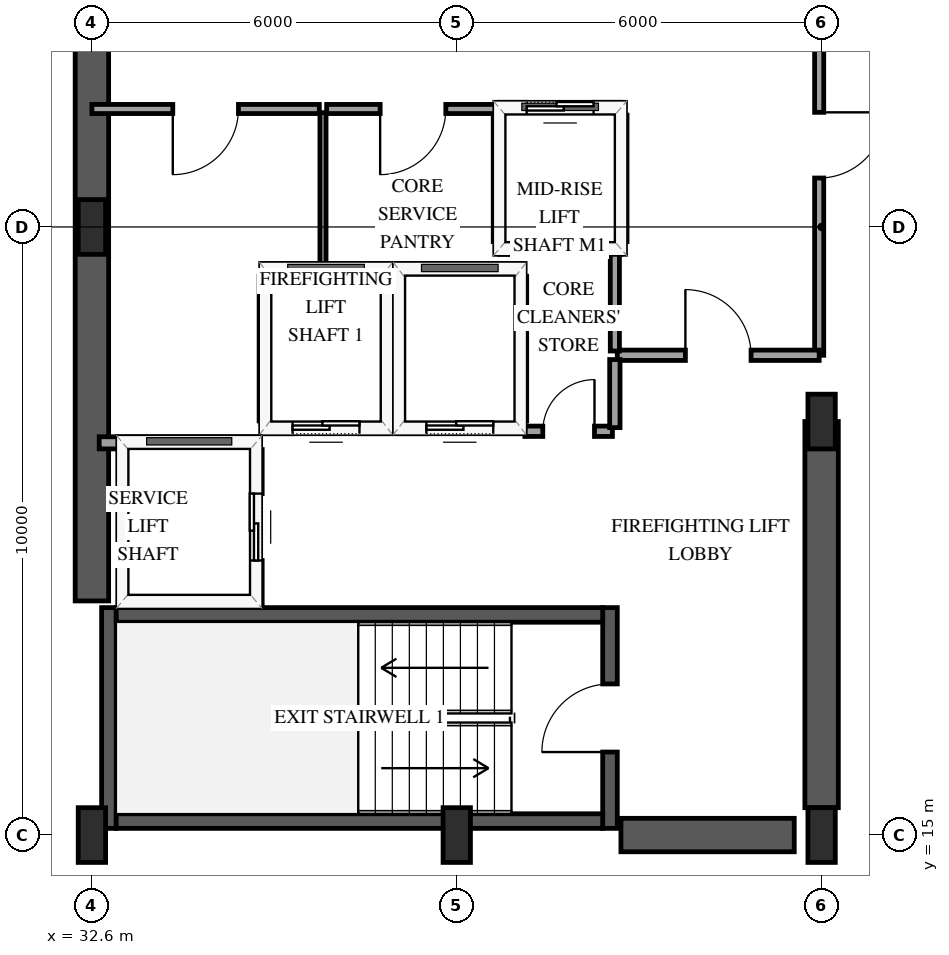
"""IFC4 building model, lengths in metres.
Left out: names, types, materials, properties, quantities, classifications, styles, units other than length and angle.
Written with IfcOpenShell. Run it as: python <this file> out.ifc"""

import sys

from ifc_helpers import new_model, si_unit, direction, frame, frame_2d, origin, origin_2d, place, context, subcontext, project, spatial, rectangle, extrude, element, fill, save


model = new_model("IFC4")
c1 = context("Model", 3, precision=1e-05, world=origin(), true_north=direction((0.0, 1.0)))
c2 = subcontext(c1, "Body", "Model", "MODEL_VIEW")
j1 = project(units=[si_unit("LENGTHUNIT", "METRE"), si_unit("PLANEANGLEUNIT", "RADIAN")], contexts=[c1])
p1 = place(None, origin())
s1 = spatial("IfcSite", under=j1, at=p1, CompositionType="ELEMENT")
p2 = place(p1, origin())
s2 = spatial("IfcBuilding", under=s1, at=p2, CompositionType="ELEMENT")
p3 = place(p2, frame((0.0, 0.0, 149.8)))
s3 = spatial("IfcBuildingStorey", under=s2, at=p3, CompositionType="ELEMENT", Elevation=149.8)
p4 = place(p3, frame((32.88, 15.11, 0.0), z_axis=(0.0, 0.0, 1.0), x_axis=(0.0, 1.0, 0.0)))
e1 = element("IfcWall", 1, at=p4, inside=s3, PredefinedType="SHEAR", context=c2, shape_type="SweptSolid", body=[
    extrude(rectangle(XDim=3.63, YDim=0.24, at=frame_2d((1.815, 0.0))), origin(), (0.0, 0.0, 1.0), 3.6),
])
p5 = place(p3, frame((41.12, 15.11, 0.0), z_axis=(0.0, 0.0, 1.0), x_axis=(0.0, 1.0, 0.0)))
e2 = element("IfcWall", 2, at=p5, inside=s3, PredefinedType="SHEAR", context=c2, shape_type="SweptSolid", body=[
    extrude(rectangle(XDim=3.63, YDim=0.24, at=frame_2d((1.815, 0.0))), origin(), (0.0, 0.0, 1.0), 3.6),
])
p6 = place(p5, frame((1.255, 0.0, 0.0)))
e3 = element("IfcOpeningElement", 3, at=p6, cuts=e2, PredefinedType="OPENING", context=c2, shape_type="SweptSolid", body=[
    extrude(rectangle(XDim=1.12, YDim=2.15, at=frame_2d((0.56, 1.075))), frame((0.0, 0.13, 0.0), z_axis=(0.0, -1.0, 0.0), x_axis=(1.0, 0.0, 0.0)), (0.0, 0.0, 1.0), 0.26),
])
for number, where, z_axis, x_axis in (
    (4, (33.0, 15.23, 0.0), (0.0, 0.0, 1.0), (1.0, 0.0, 0.0)),
    (5, (33.0, 18.62, 0.0), (0.0, 0.0, 1.0), (1.0, 0.0, 0.0)),
):
    element("IfcWall", number, at=place(p3, frame(where, z_axis=z_axis, x_axis=x_axis)), inside=s3, PredefinedType="SHEAR", context=c2, shape_type="SweptSolid", body=[
        extrude(rectangle(XDim=8.0, YDim=0.24, at=frame_2d((4.0, 0.0))), origin(), (0.0, 0.0, 1.0), 3.6),
    ])
p7 = place(p3, frame((32.6, 18.85, 0.0), z_axis=(0.0, 0.0, 1.0), x_axis=(0.0, 1.0, 0.0)))
e6 = element("IfcWall", 6, at=p7, inside=s3, PredefinedType="SHEAR", context=c2, shape_type="SweptSolid", body=[
    extrude(rectangle(XDim=12.3, YDim=0.55, at=frame_2d((6.15, 0.0))), origin(), (0.0, 0.0, 1.0), 3.6),
])
p8 = place(p3, frame((41.3, 15.0, 0.0), z_axis=(0.0, 0.0, 1.0), x_axis=(1.0, 0.0, 0.0)))
e7 = element("IfcWall", 7, at=p8, inside=s3, PredefinedType="SHEAR", context=c2, shape_type="SweptSolid", body=[
    extrude(rectangle(XDim=2.85, YDim=0.55, at=frame_2d((1.425, 0.0))), origin(), (0.0, 0.0, 1.0), 3.6),
])
p9 = place(p3, frame((44.6, 15.45, 0.0), z_axis=(0.0, 0.0, 1.0), x_axis=(0.0, 1.0, 0.0)))
e8 = element("IfcWall", 8, at=p9, inside=s3, PredefinedType="SHEAR", context=c2, shape_type="SweptSolid", body=[
    extrude(rectangle(XDim=6.35, YDim=0.55, at=frame_2d((3.175, 0.0))), origin(), (0.0, 0.0, 1.0), 3.6),
])
for number, where, z_axis, x_axis in (
    (9, (32.6, 15.0, 0.0), (0.0, 0.0, 1.0), (1.0, 0.0, 0.0)),
    (10, (32.6, 25.0, 0.0), (0.0, 0.0, 1.0), (1.0, 0.0, 0.0)),
    (11, (38.6, 15.0, 0.0), (0.0, 0.0, 1.0), (1.0, 0.0, 0.0)),
    (12, (44.6, 15.0, 0.0), (0.0, 0.0, 1.0), (1.0, 0.0, 0.0)),
    (13, (44.6, 21.8, 0.0), (0.0, 0.0, 1.0), (1.0, 0.0, 0.0)),
):
    element("IfcColumn", number, at=place(p3, frame(where, z_axis=z_axis, x_axis=x_axis)), inside=s3, PredefinedType="PILASTER", context=c2, shape_type="SweptSolid", body=[
        extrude(rectangle(XDim=0.45, YDim=0.9, at=origin_2d()), origin(), (0.0, 0.0, 1.0), 3.6),
    ])
p10 = place(p3, frame((35.45, 21.7, 0.0), z_axis=(0.0, 0.0, 1.0), x_axis=(1.0, 0.0, 0.0)))
e14 = element("IfcWall", 14, at=p10, inside=s3, PredefinedType="SOLIDWALL", context=c2, shape_type="SweptSolid", body=[
    extrude(rectangle(XDim=2.0, YDim=0.2, at=frame_2d((1.0, 0.0))), origin(), (0.0, 0.0, 1.0), 3.3),
])
p11 = place(p10, frame((0.45, 0.0, 0.0)))
e15 = element("IfcOpeningElement", 15, at=p11, cuts=e14, PredefinedType="OPENING", context=c2, shape_type="SweptSolid", body=[
    extrude(rectangle(XDim=1.1, YDim=2.15, at=frame_2d((0.55, 1.075))), frame((0.0, 0.11, 0.0), z_axis=(0.0, -1.0, 0.0), x_axis=(1.0, 0.0, 0.0)), (0.0, 0.0, 1.0), 0.22),
])
p12 = place(p3, frame((35.45, 24.3, 0.0), z_axis=(0.0, 0.0, 1.0), x_axis=(1.0, 0.0, 0.0)))
e16 = element("IfcWall", 16, at=p12, inside=s3, PredefinedType="SOLIDWALL", context=c2, shape_type="SweptSolid", body=[
    extrude(rectangle(XDim=2.0, YDim=0.2, at=frame_2d((1.0, 0.0))), origin(), (0.0, 0.0, 1.0), 3.3),
])
for number, where, z_axis, x_axis in (
    (17, (35.45, 21.81, 0.0), (0.0, 0.0, 1.0), (0.0, 1.0, 0.0)),
    (18, (37.45, 21.81, 0.0), (0.0, 0.0, 1.0), (0.0, 1.0, 0.0)),
):
    element("IfcWall", number, at=place(p3, frame(where, z_axis=z_axis, x_axis=x_axis)), inside=s3, PredefinedType="SOLIDWALL", context=c2, shape_type="SweptSolid", body=[
        extrude(rectangle(XDim=2.38, YDim=0.2, at=frame_2d((1.19, 0.0))), origin(), (0.0, 0.0, 1.0), 3.3),
    ])
p13 = place(p3, frame((37.65, 21.7, 0.0), z_axis=(0.0, 0.0, 1.0), x_axis=(1.0, 0.0, 0.0)))
e19 = element("IfcWall", 19, at=p13, inside=s3, PredefinedType="SOLIDWALL", context=c2, shape_type="SweptSolid", body=[
    extrude(rectangle(XDim=2.0, YDim=0.2, at=frame_2d((1.0, 0.0))), origin(), (0.0, 0.0, 1.0), 3.3),
])
p14 = place(p13, frame((0.45, 0.0, 0.0)))
e20 = element("IfcOpeningElement", 20, at=p14, cuts=e19, PredefinedType="OPENING", context=c2, shape_type="SweptSolid", body=[
    extrude(rectangle(XDim=1.1, YDim=2.15, at=frame_2d((0.55, 1.075))), frame((0.0, 0.11, 0.0), z_axis=(0.0, -1.0, 0.0), x_axis=(1.0, 0.0, 0.0)), (0.0, 0.0, 1.0), 0.22),
])
p15 = place(p3, frame((37.65, 24.3, 0.0), z_axis=(0.0, 0.0, 1.0), x_axis=(1.0, 0.0, 0.0)))
e21 = element("IfcWall", 21, at=p15, inside=s3, PredefinedType="SOLIDWALL", context=c2, shape_type="SweptSolid", body=[
    extrude(rectangle(XDim=2.0, YDim=0.2, at=frame_2d((1.0, 0.0))), origin(), (0.0, 0.0, 1.0), 3.3),
])
p16 = place(p3, frame((39.65, 21.81, 0.0), z_axis=(0.0, 0.0, 1.0), x_axis=(0.0, 1.0, 0.0)))
e22 = element("IfcWall", 22, at=p16, inside=s3, PredefinedType="SOLIDWALL", context=c2, shape_type="SweptSolid", body=[
    extrude(rectangle(XDim=2.38, YDim=0.2, at=frame_2d((1.19, 0.0))), origin(), (0.0, 0.0, 1.0), 3.3),
])
p17 = place(p3, frame((32.72, 21.45, 0.0), z_axis=(0.0, 0.0, 1.0), x_axis=(1.0, 0.0, 0.0)))
e23 = element("IfcWall", 23, at=p17, inside=s3, PredefinedType="SOLIDWALL", context=c2, shape_type="SweptSolid", body=[
    extrude(rectangle(XDim=2.58, YDim=0.2, at=frame_2d((1.29, 0.0))), origin(), (0.0, 0.0, 1.0), 3.3),
])
p18 = place(p3, frame((35.3, 18.79, 0.0), z_axis=(0.0, 0.0, 1.0), x_axis=(0.0, 1.0, 0.0)))
e24 = element("IfcWall", 24, at=p18, inside=s3, PredefinedType="SOLIDWALL", context=c2, shape_type="SweptSolid", body=[
    extrude(rectangle(XDim=2.55, YDim=0.2, at=frame_2d((1.275, 0.0))), origin(), (0.0, 0.0, 1.0), 3.3),
])
p19 = place(p18, frame((0.725, 0.0, 0.0)))
e25 = element("IfcOpeningElement", 25, at=p19, cuts=e24, PredefinedType="OPENING", context=c2, shape_type="SweptSolid", body=[
    extrude(rectangle(XDim=1.1, YDim=2.15, at=frame_2d((0.55, 1.075))), frame((0.0, 0.11, 0.0), z_axis=(0.0, -1.0, 0.0), x_axis=(1.0, 0.0, 0.0)), (0.0, 0.0, 1.0), 0.22),
])
p20 = place(p3, frame((39.3, 24.65, 0.0), z_axis=(0.0, 0.0, 1.0), x_axis=(1.0, 0.0, 0.0)))
e26 = element("IfcWall", 26, at=p20, inside=s3, PredefinedType="SOLIDWALL", context=c2, shape_type="SweptSolid", body=[
    extrude(rectangle(XDim=2.0, YDim=0.2, at=frame_2d((1.0, 0.0))), origin(), (0.0, 0.0, 1.0), 3.3),
])
p21 = place(p3, frame((39.3, 26.95, 0.0), z_axis=(0.0, 0.0, 1.0), x_axis=(1.0, 0.0, 0.0)))
e27 = element("IfcWall", 27, at=p21, inside=s3, PredefinedType="SOLIDWALL", context=c2, shape_type="SweptSolid", body=[
    extrude(rectangle(XDim=2.0, YDim=0.2, at=frame_2d((1.0, 0.0))), origin(), (0.0, 0.0, 1.0), 3.3),
])
p22 = place(p21, frame((0.45, 0.0, 0.0)))
e28 = element("IfcOpeningElement", 28, at=p22, cuts=e27, PredefinedType="OPENING", context=c2, shape_type="SweptSolid", body=[
    extrude(rectangle(XDim=1.1, YDim=2.15, at=frame_2d((0.55, 1.075))), frame((0.0, 0.11, 0.0), z_axis=(0.0, -1.0, 0.0), x_axis=(1.0, 0.0, 0.0)), (0.0, 0.0, 1.0), 0.22),
])
for number, where, z_axis, x_axis in (
    (29, (39.3, 24.76, 0.0), (0.0, 0.0, 1.0), (0.0, 1.0, 0.0)),
    (30, (41.3, 24.76, 0.0), (0.0, 0.0, 1.0), (0.0, 1.0, 0.0)),
):
    element("IfcWall", number, at=place(p3, frame(where, z_axis=z_axis, x_axis=x_axis)), inside=s3, PredefinedType="SOLIDWALL", context=c2, shape_type="SweptSolid", body=[
        extrude(rectangle(XDim=2.08, YDim=0.2, at=frame_2d((1.04, 0.0))), origin(), (0.0, 0.0, 1.0), 3.3),
    ])
p23 = place(p3, frame((44.56, 29.8, 0.0), z_axis=(0.0, 0.0, 1.0), x_axis=(0.0, -1.0, 0.0)))
e31 = element("IfcWall", 31, at=p23, inside=s3, PredefinedType="PARTITIONING", context=c2, shape_type="SweptSolid", body=[
    extrude(rectangle(XDim=6.91, YDim=0.15, at=frame_2d((3.455, 0.0))), origin(), (0.0, 0.0, 1.0), 2.34),
])
p24 = place(p23, frame((2.915, 0.0, 0.0)))
e32 = element("IfcOpeningElement", 32, at=p24, cuts=e31, PredefinedType="OPENING", context=c2, shape_type="SweptSolid", body=[
    extrude(rectangle(XDim=1.08, YDim=2.15, at=frame_2d((0.54, 1.075))), frame((0.0, 0.085, 0.0), z_axis=(0.0, -1.0, 0.0), x_axis=(1.0, 0.0, 0.0)), (0.0, 0.0, 1.0), 0.17),
])
p25 = place(p3, frame((36.34, 26.94, 0.0), z_axis=(0.0, 0.0, 1.0), x_axis=(-1.0, 0.0, 0.0)))
e33 = element("IfcWall", 33, at=p25, inside=s3, PredefinedType="PARTITIONING", context=c2, shape_type="SweptSolid", body=[
    extrude(rectangle(XDim=3.74, YDim=0.15, at=frame_2d((1.87, 0.0))), origin(), (0.0, 0.0, 1.0), 3.3),
])
p26 = place(p25, frame((1.33, 0.0, 0.0)))
e34 = element("IfcOpeningElement", 34, at=p26, cuts=e33, PredefinedType="OPENING", context=c2, shape_type="SweptSolid", body=[
    extrude(rectangle(XDim=1.08, YDim=2.15, at=frame_2d((0.54, 1.075))), frame((0.0, 0.085, 0.0), z_axis=(0.0, -1.0, 0.0), x_axis=(1.0, 0.0, 0.0)), (0.0, 0.0, 1.0), 0.17),
])
p27 = place(p3, frame((41.24, 22.89, 0.0), z_axis=(0.0, 0.0, 1.0), x_axis=(1.0, 0.0, 0.0)))
e35 = element("IfcWall", 35, at=p27, inside=s3, PredefinedType="PARTITIONING", context=c2, shape_type="SweptSolid", body=[
    extrude(rectangle(XDim=3.32, YDim=0.17, at=frame_2d((1.66, 0.0))), origin(), (0.0, 0.0, 1.0), 3.3),
])
p28 = place(p27, frame((1.12, 0.0, 0.0)))
e36 = element("IfcOpeningElement", 36, at=p28, cuts=e35, PredefinedType="OPENING", context=c2, shape_type="SweptSolid", body=[
    extrude(rectangle(XDim=1.08, YDim=2.15, at=frame_2d((0.54, 1.075))), frame((0.0, 0.095, 0.0), z_axis=(0.0, -1.0, 0.0), x_axis=(1.0, 0.0, 0.0)), (0.0, 0.0, 1.0), 0.19),
])
p29 = place(p3, frame((39.3, 26.94, 0.0), z_axis=(0.0, 0.0, 1.0), x_axis=(-1.0, 0.0, 0.0)))
e37 = element("IfcWall", 37, at=p29, inside=s3, PredefinedType="PARTITIONING", context=c2, shape_type="SweptSolid", body=[
    extrude(rectangle(XDim=2.84, YDim=0.15, at=frame_2d((1.42, 0.0))), origin(), (0.0, 0.0, 1.0), 3.3),
])
p30 = place(p29, frame((0.88, 0.0, 0.0)))
e38 = element("IfcOpeningElement", 38, at=p30, cuts=e37, PredefinedType="OPENING", context=c2, shape_type="SweptSolid", body=[
    extrude(rectangle(XDim=1.08, YDim=2.15, at=frame_2d((0.54, 1.075))), frame((0.0, 0.085, 0.0), z_axis=(0.0, -1.0, 0.0), x_axis=(1.0, 0.0, 0.0)), (0.0, 0.0, 1.0), 0.17),
])
p31 = place(p3, frame((36.4, 26.88, 0.0), z_axis=(0.0, 0.0, 1.0), x_axis=(0.0, -1.0, 0.0)))
e39 = element("IfcWall", 39, at=p31, inside=s3, PredefinedType="PARTITIONING", context=c2, shape_type="SweptSolid", body=[
    extrude(rectangle(XDim=2.58, YDim=0.1, at=frame_2d((1.29, 0.0))), origin(), (0.0, 0.0, 1.0), 3.3),
])
p32 = place(p3, frame((41.2, 22.96, 0.0), z_axis=(0.0, 0.0, 1.0), x_axis=(0.0, 1.0, 0.0)))
e40 = element("IfcWall", 40, at=p32, inside=s3, PredefinedType="PARTITIONING", context=c2, shape_type="SweptSolid", body=[
    extrude(rectangle(XDim=1.69, YDim=0.15, at=frame_2d((0.845, 0.0))), origin(), (0.0, 0.0, 1.0), 3.3),
])
p33 = place(p3, frame((39.72, 21.64, 0.0), z_axis=(0.0, 0.0, 1.0), x_axis=(1.0, 0.0, 0.0)))
e41 = element("IfcWall", 41, at=p33, inside=s3, PredefinedType="PARTITIONING", context=c2, shape_type="SweptSolid", body=[
    extrude(rectangle(XDim=1.44, YDim=0.17, at=frame_2d((0.72, 0.0))), origin(), (0.0, 0.0, 1.0), 3.3),
])
p34 = place(p33, frame((0.295, 0.0, 0.0)))
e42 = element("IfcOpeningElement", 42, at=p34, cuts=e41, PredefinedType="OPENING", context=c2, shape_type="SweptSolid", body=[
    extrude(rectangle(XDim=0.85, YDim=2.1, at=frame_2d((0.425, 1.05))), frame((0.0, 0.095, 0.0), z_axis=(0.0, -1.0, 0.0), x_axis=(1.0, 0.0, 0.0)), (0.0, 0.0, 1.0), 0.19),
])
p35 = place(p3, frame((41.2, 21.7, 0.0), z_axis=(0.0, 0.0, 1.0), x_axis=(0.0, 1.0, 0.0)))
e43 = element("IfcWall", 43, at=p35, inside=s3, PredefinedType="PARTITIONING", context=c2, shape_type="SweptSolid", body=[
    extrude(rectangle(XDim=1.12, YDim=0.17, at=frame_2d((0.56, 0.0))), origin(), (0.0, 0.0, 1.0), 3.3),
])
p36 = place(p11, origin())
e44 = element("IfcDoor", 44, at=p36, inside=s3, OperationType="SLIDING_TO_LEFT", PredefinedType="DOOR", context=c2, shape_type="SweptSolid", body=[
    extrude(rectangle(XDim=1.1, YDim=2.15, at=frame_2d((0.55, 1.075))), frame((0.0, 0.025, 0.0), z_axis=(0.0, -1.0, 0.0), x_axis=(1.0, 0.0, 0.0)), (0.0, 0.0, 1.0), 0.05),
])
fill(e15, e44)
p37 = place(p14, origin())
e45 = element("IfcDoor", 45, at=p37, inside=s3, OperationType="SLIDING_TO_LEFT", PredefinedType="DOOR", context=c2, shape_type="SweptSolid", body=[
    extrude(rectangle(XDim=1.1, YDim=2.15, at=frame_2d((0.55, 1.075))), frame((0.0, 0.025, 0.0), z_axis=(0.0, -1.0, 0.0), x_axis=(1.0, 0.0, 0.0)), (0.0, 0.0, 1.0), 0.05),
])
fill(e20, e45)
p38 = place(p19, origin())
e46 = element("IfcDoor", 46, at=p38, inside=s3, OperationType="SLIDING_TO_LEFT", PredefinedType="DOOR", context=c2, shape_type="SweptSolid", body=[
    extrude(rectangle(XDim=1.1, YDim=2.15, at=frame_2d((0.55, 1.075))), frame((0.0, 0.025, 0.0), z_axis=(0.0, -1.0, 0.0), x_axis=(1.0, 0.0, 0.0)), (0.0, 0.0, 1.0), 0.05),
])
fill(e25, e46)
p39 = place(p22, origin())
e47 = element("IfcDoor", 47, at=p39, inside=s3, OperationType="SLIDING_TO_LEFT", PredefinedType="DOOR", context=c2, shape_type="SweptSolid", body=[
    extrude(rectangle(XDim=1.1, YDim=2.15, at=frame_2d((0.55, 1.075))), frame((0.0, 0.025, 0.0), z_axis=(0.0, -1.0, 0.0), x_axis=(1.0, 0.0, 0.0)), (0.0, 0.0, 1.0), 0.05),
])
fill(e28, e47)
p40 = place(p6, origin())
e48 = element("IfcDoor", 48, at=p40, inside=s3, OperationType="SINGLE_SWING_LEFT", PredefinedType="DOOR", context=c2, shape_type="SweptSolid", body=[
    extrude(rectangle(XDim=1.12, YDim=2.15, at=frame_2d((0.56, 1.075))), frame((0.0, 0.025, 0.0), z_axis=(0.0, -1.0, 0.0), x_axis=(1.0, 0.0, 0.0)), (0.0, 0.0, 1.0), 0.05),
])
fill(e3, e48)
p41 = place(p24, origin())
e49 = element("IfcDoor", 49, at=p41, inside=s3, OperationType="SINGLE_SWING_LEFT", PredefinedType="DOOR", context=c2, shape_type="SweptSolid", body=[
    extrude(rectangle(XDim=1.08, YDim=2.15, at=frame_2d((0.54, 1.075))), frame((0.0, 0.025, 0.0), z_axis=(0.0, -1.0, 0.0), x_axis=(1.0, 0.0, 0.0)), (0.0, 0.0, 1.0), 0.05),
])
fill(e32, e49)
p42 = place(p26, origin())
e50 = element("IfcDoor", 50, at=p42, inside=s3, OperationType="SINGLE_SWING_RIGHT", PredefinedType="DOOR", context=c2, shape_type="SweptSolid", body=[
    extrude(rectangle(XDim=1.08, YDim=2.15, at=frame_2d((0.54, 1.075))), frame((0.0, 0.025, 0.0), z_axis=(0.0, -1.0, 0.0), x_axis=(1.0, 0.0, 0.0)), (0.0, 0.0, 1.0), 0.05),
])
fill(e34, e50)
p43 = place(p28, origin())
e51 = element("IfcDoor", 51, at=p43, inside=s3, OperationType="SINGLE_SWING_LEFT", PredefinedType="DOOR", context=c2, shape_type="SweptSolid", body=[
    extrude(rectangle(XDim=1.08, YDim=2.15, at=frame_2d((0.54, 1.075))), frame((0.0, 0.025, 0.0), z_axis=(0.0, -1.0, 0.0), x_axis=(1.0, 0.0, 0.0)), (0.0, 0.0, 1.0), 0.05),
])
fill(e36, e51)
p44 = place(p30, origin())
e52 = element("IfcDoor", 52, at=p44, inside=s3, OperationType="SINGLE_SWING_RIGHT", PredefinedType="DOOR", context=c2, shape_type="SweptSolid", body=[
    extrude(rectangle(XDim=1.08, YDim=2.15, at=frame_2d((0.54, 1.075))), frame((0.0, 0.025, 0.0), z_axis=(0.0, -1.0, 0.0), x_axis=(1.0, 0.0, 0.0)), (0.0, 0.0, 1.0), 0.05),
])
fill(e38, e52)
p45 = place(p34, origin())
e53 = element("IfcDoor", 53, at=p45, inside=s3, OperationType="SINGLE_SWING_RIGHT", PredefinedType="DOOR", context=c2, shape_type="SweptSolid", body=[
    extrude(rectangle(XDim=0.85, YDim=2.1, at=frame_2d((0.425, 1.05))), frame((0.0, 0.025, 0.0), z_axis=(0.0, -1.0, 0.0), x_axis=(1.0, 0.0, 0.0)), (0.0, 0.0, 1.0), 0.05),
])
fill(e42, e53)
save(model, sys.argv[1])
